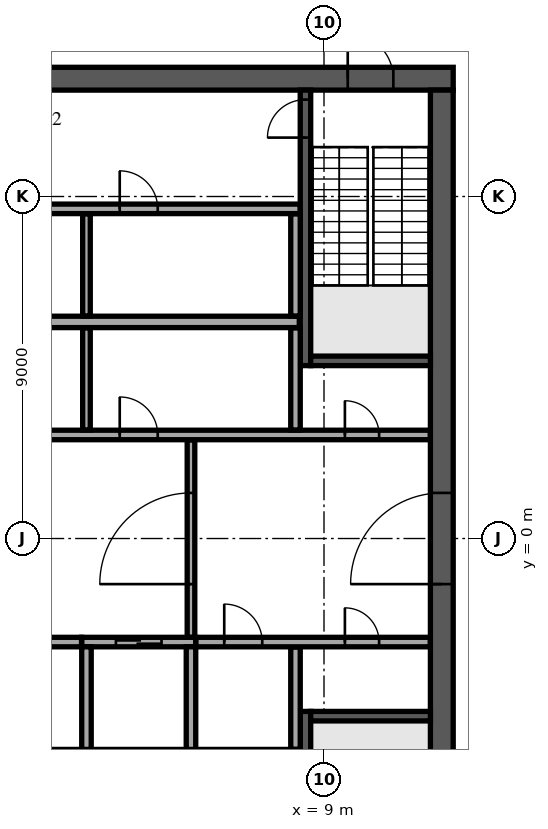
"""IFC4 building model, lengths in metres.
Left out: names, types, materials, properties, quantities, classifications, styles, units other than length and angle.
Written with IfcOpenShell. Run it as: python <this file> out.ifc"""

import sys

from ifc_helpers import new_model, si_unit, direction, frame, frame_2d, origin, place, context, subcontext, project, spatial, rectangle, extrude, element, fill, save


model = new_model("IFC4")
c1 = context("Model", 3, precision=1e-05, world=origin(), true_north=direction((0.0, 1.0)))
c2 = subcontext(c1, "Body", "Model", "MODEL_VIEW")
j1 = project(units=[si_unit("LENGTHUNIT", "METRE"), si_unit("PLANEANGLEUNIT", "RADIAN")], contexts=[c1])
p1 = place(None, origin())
s1 = spatial("IfcSite", under=j1, at=p1, CompositionType="ELEMENT")
p2 = place(p1, origin())
s2 = spatial("IfcBuilding", under=s1, at=p2, CompositionType="ELEMENT")
p3 = place(p2, frame((0.0, 0.0, 368.1)))
s3 = spatial("IfcBuildingStorey", under=s2, at=p3, CompositionType="ELEMENT", Elevation=368.1)
p4 = place(p3, frame((-12.4, 12.1, 0.0), z_axis=(0.0, 0.0, 1.0), x_axis=(1.0, 0.0, 0.0)))
e1 = element("IfcWall", 1, at=p4, inside=s3, PredefinedType="SHEAR", context=c2, shape_type="SweptSolid", body=[
    extrude(rectangle(XDim=24.8, YDim=0.6, at=frame_2d((12.4, 0.0))), origin(), (0.0, 0.0, 1.0), 4.7),
])
p5 = place(p4, frame((11.2, 0.0, 0.0)))
e2 = element("IfcOpeningElement", 2, at=p5, cuts=e1, PredefinedType="OPENING", context=c2, shape_type="SweptSolid", body=[
    extrude(rectangle(XDim=2.4, YDim=2.4, at=frame_2d((1.2, 1.2))), frame((0.0, 0.31, 0.0), z_axis=(0.0, -1.0, 0.0), x_axis=(1.0, 0.0, 0.0)), (0.0, 0.0, 1.0), 0.62),
])
p6 = place(p4, frame((22.025, 0.0, 0.0)))
e3 = element("IfcOpeningElement", 3, at=p6, cuts=e1, PredefinedType="OPENING", context=c2, shape_type="SweptSolid", body=[
    extrude(rectangle(XDim=1.2, YDim=2.1, at=frame_2d((0.6, 1.05))), frame((0.0, 0.31, 0.0), z_axis=(0.0, -1.0, 0.0), x_axis=(1.0, 0.0, 0.0)), (0.0, 0.0, 1.0), 0.62),
])
p7 = place(p4, frame((1.0, 0.0, 0.0)))
e4 = element("IfcOpeningElement", 4, at=p7, cuts=e1, PredefinedType="OPENING", context=c2, shape_type="SweptSolid", body=[
    extrude(rectangle(XDim=1.0, YDim=2.1, at=frame_2d((0.5, 1.05))), frame((0.0, 0.31, 0.0), z_axis=(0.0, -1.0, 0.0), x_axis=(1.0, 0.0, 0.0)), (0.0, 0.0, 1.0), 0.62),
])
p8 = place(p3, frame((12.1, -11.8, 0.0), z_axis=(0.0, 0.0, 1.0), x_axis=(0.0, 1.0, 0.0)))
e5 = element("IfcWall", 5, at=p8, inside=s3, PredefinedType="SHEAR", context=c2, shape_type="SweptSolid", body=[
    extrude(rectangle(XDim=23.6, YDim=0.6, at=frame_2d((11.8, 0.0))), origin(), (0.0, 0.0, 1.0), 4.7),
])
p9 = place(p8, frame((10.6, 0.0, 0.0)))
e6 = element("IfcOpeningElement", 6, at=p9, cuts=e5, PredefinedType="OPENING", context=c2, shape_type="SweptSolid", body=[
    extrude(rectangle(XDim=2.4, YDim=2.4, at=frame_2d((1.2, 1.2))), frame((0.0, 0.31, 0.0), z_axis=(0.0, -1.0, 0.0), x_axis=(1.0, 0.0, 0.0)), (0.0, 0.0, 1.0), 0.62),
])
p10 = place(p3, frame((-2.875, -5.7, 0.0), z_axis=(0.0, 0.0, 1.0), x_axis=(1.0, 0.0, 0.0)))
e7 = element("IfcWall", 7, at=p10, inside=s3, PredefinedType="SOLIDWALL", context=c2, shape_type="SweptSolid", body=[
    extrude(rectangle(XDim=11.25, YDim=0.3, at=frame_2d((5.625, 0.0))), origin(), (0.0, 0.0, 1.0), 4.7),
])
p11 = place(p3, frame((2.625, -2.725, 0.0), z_axis=(0.0, 0.0, 1.0), x_axis=(1.0, 0.0, 0.0)))
e8 = element("IfcWall", 8, at=p11, inside=s3, PredefinedType="SOLIDWALL", context=c2, shape_type="SweptSolid", body=[
    extrude(rectangle(XDim=3.0, YDim=0.25, at=frame_2d((1.5, 0.0))), origin(), (0.0, 0.0, 1.0), 4.7),
])
p12 = place(p11, frame((0.9, 0.0, 0.0)))
e9 = element("IfcOpeningElement", 9, at=p12, cuts=e8, PredefinedType="OPENING", context=c2, shape_type="SweptSolid", body=[
    extrude(rectangle(XDim=1.2, YDim=2.1, at=frame_2d((0.6, 1.05))), frame((0.0, 0.135, 0.0), z_axis=(0.0, -1.0, 0.0), x_axis=(1.0, 0.0, 0.0)), (0.0, 0.0, 1.0), 0.27),
])
for number, where, z_axis, x_axis in (
    (10, (2.75, -5.55, 0.0), (0.0, 0.0, 1.0), (0.0, 1.0, 0.0)),
    (11, (5.5, -5.55, 0.0), (0.0, 0.0, 1.0), (0.0, 1.0, 0.0)),
):
    element("IfcWall", number, at=place(p3, frame(where, z_axis=z_axis, x_axis=x_axis)), inside=s3, PredefinedType="SOLIDWALL", context=c2, shape_type="SweptSolid", body=[
        extrude(rectangle(XDim=2.7, YDim=0.25, at=frame_2d((1.35, 0.0))), origin(), (0.0, 0.0, 1.0), 4.7),
    ])
p13 = place(p3, frame((8.512, 4.55, 0.0), z_axis=(0.0, 0.0, 1.0), x_axis=(0.0, 1.0, 0.0)))
e12 = element("IfcWall", 12, at=p13, inside=s3, PredefinedType="SOLIDWALL", context=c2, shape_type="SweptSolid", body=[
    extrude(rectangle(XDim=7.25, YDim=0.275, at=frame_2d((3.625, 0.0))), origin(), (0.0, 0.0, 1.0), 4.7),
])
p14 = place(p13, frame((6.0, 0.0, 0.0)))
e13 = element("IfcOpeningElement", 13, at=p14, cuts=e12, PredefinedType="OPENING", context=c2, shape_type="SweptSolid", body=[
    extrude(rectangle(XDim=1.0, YDim=2.1, at=frame_2d((0.5, 1.05))), frame((0.0, 0.147, 0.0), z_axis=(0.0, -1.0, 0.0), x_axis=(1.0, 0.0, 0.0)), (0.0, 0.0, 1.0), 0.295),
])
p15 = place(p3, frame((8.65, 4.675, 0.0), z_axis=(0.0, 0.0, 1.0), x_axis=(1.0, 0.0, 0.0)))
e14 = element("IfcWall", 14, at=p15, inside=s3, PredefinedType="SOLIDWALL", context=c2, shape_type="SweptSolid", body=[
    extrude(rectangle(XDim=3.15, YDim=0.25, at=frame_2d((1.575, 0.0))), origin(), (0.0, 0.0, 1.0), 4.7),
])
p16 = place(p3, frame((8.512, -4.55, 0.0), z_axis=(0.0, 0.0, 1.0), x_axis=(0.0, -1.0, 0.0)))
e15 = element("IfcWall", 15, at=p16, inside=s3, PredefinedType="SOLIDWALL", context=c2, shape_type="SweptSolid", body=[
    extrude(rectangle(XDim=7.25, YDim=0.275, at=frame_2d((3.625, 0.0))), origin(), (0.0, 0.0, 1.0), 4.7),
])
p17 = place(p16, frame((6.0, 0.0, 0.0)))
e16 = element("IfcOpeningElement", 16, at=p17, cuts=e15, PredefinedType="OPENING", context=c2, shape_type="SweptSolid", body=[
    extrude(rectangle(XDim=1.0, YDim=2.1, at=frame_2d((0.5, 1.05))), frame((0.0, 0.147, 0.0), z_axis=(0.0, -1.0, 0.0), x_axis=(1.0, 0.0, 0.0)), (0.0, 0.0, 1.0), 0.295),
])
p18 = place(p3, frame((8.65, -4.675, 0.0), z_axis=(0.0, 0.0, 1.0), x_axis=(1.0, 0.0, 0.0)))
e17 = element("IfcWall", 17, at=p18, inside=s3, PredefinedType="SOLIDWALL", context=c2, shape_type="SweptSolid", body=[
    extrude(rectangle(XDim=3.15, YDim=0.25, at=frame_2d((1.575, 0.0))), origin(), (0.0, 0.0, 1.0), 4.7),
])
p19 = place(p3, frame((8.25, -5.545, 0.0), z_axis=(0.0, 0.0, 1.0), x_axis=(0.0, 1.0, 0.0)))
e18 = element("IfcWall", 18, at=p19, inside=s3, PredefinedType="PARTITIONING", context=c2, shape_type="SweptSolid", body=[
    extrude(rectangle(XDim=2.69, YDim=0.25, at=frame_2d((1.345, 0.0))), origin(), (0.0, 0.0, 1.0), 4.7),
])
p20 = place(p3, frame((-11.795, -2.725, 0.0), z_axis=(0.0, 0.0, 1.0), x_axis=(1.0, 0.0, 0.0)))
e19 = element("IfcWall", 19, at=p20, inside=s3, PredefinedType="PARTITIONING", context=c2, shape_type="SweptSolid", body=[
    extrude(rectangle(XDim=14.415, YDim=0.25, at=frame_2d((7.208, 0.0))), origin(), (0.0, 0.0, 1.0), 4.7),
])
p21 = place(p20, frame((1.295, 0.0, 0.0)))
e20 = element("IfcOpeningElement", 20, at=p21, cuts=e19, PredefinedType="OPENING", context=c2, shape_type="SweptSolid", body=[
    extrude(rectangle(XDim=1.0, YDim=2.1, at=frame_2d((0.5, 1.05))), frame((0.0, 0.135, 0.0), z_axis=(0.0, -1.0, 0.0), x_axis=(1.0, 0.0, 0.0)), (0.0, 0.0, 1.0), 0.27),
])
p22 = place(p20, frame((4.42, 0.0, 0.0)))
e21 = element("IfcOpeningElement", 21, at=p22, cuts=e19, PredefinedType="OPENING", context=c2, shape_type="SweptSolid", body=[
    extrude(rectangle(XDim=1.0, YDim=2.1, at=frame_2d((0.5, 1.05))), frame((0.0, 0.135, 0.0), z_axis=(0.0, -1.0, 0.0), x_axis=(1.0, 0.0, 0.0)), (0.0, 0.0, 1.0), 0.27),
])
p23 = place(p20, frame((9.92, 0.0, 0.0)))
e22 = element("IfcOpeningElement", 22, at=p23, cuts=e19, PredefinedType="OPENING", context=c2, shape_type="SweptSolid", body=[
    extrude(rectangle(XDim=1.0, YDim=2.1, at=frame_2d((0.5, 1.05))), frame((0.0, 0.135, 0.0), z_axis=(0.0, -1.0, 0.0), x_axis=(1.0, 0.0, 0.0)), (0.0, 0.0, 1.0), 0.27),
])
p24 = place(p3, frame((5.63, -2.725, 0.0), z_axis=(0.0, 0.0, 1.0), x_axis=(1.0, 0.0, 0.0)))
e23 = element("IfcWall", 23, at=p24, inside=s3, PredefinedType="PARTITIONING", context=c2, shape_type="SweptSolid", body=[
    extrude(rectangle(XDim=6.165, YDim=0.25, at=frame_2d((3.083, 0.0))), origin(), (0.0, 0.0, 1.0), 4.7),
])
p25 = place(p24, frame((0.745, 0.0, 0.0)))
e24 = element("IfcOpeningElement", 24, at=p25, cuts=e23, PredefinedType="OPENING", context=c2, shape_type="SweptSolid", body=[
    extrude(rectangle(XDim=1.0, YDim=2.1, at=frame_2d((0.5, 1.05))), frame((0.0, 0.135, 0.0), z_axis=(0.0, -1.0, 0.0), x_axis=(1.0, 0.0, 0.0)), (0.0, 0.0, 1.0), 0.27),
])
p26 = place(p24, frame((3.92, 0.0, 0.0)))
e25 = element("IfcOpeningElement", 25, at=p26, cuts=e23, PredefinedType="OPENING", context=c2, shape_type="SweptSolid", body=[
    extrude(rectangle(XDim=0.9, YDim=2.1, at=frame_2d((0.45, 1.05))), frame((0.0, 0.135, 0.0), z_axis=(0.0, -1.0, 0.0), x_axis=(1.0, 0.0, 0.0)), (0.0, 0.0, 1.0), 0.27),
])
p27 = place(p3, frame((5.5, -2.595, 0.0), z_axis=(0.0, 0.0, 1.0), x_axis=(0.0, 1.0, 0.0)))
e26 = element("IfcWall", 26, at=p27, inside=s3, PredefinedType="PARTITIONING", context=c2, shape_type="SweptSolid", body=[
    extrude(rectangle(XDim=5.19, YDim=0.2, at=frame_2d((2.595, 0.0))), origin(), (0.0, 0.0, 1.0), 4.7),
])
p28 = place(p27, frame((1.395, 0.0, 0.0)))
e27 = element("IfcOpeningElement", 27, at=p28, cuts=e26, PredefinedType="OPENING", context=c2, shape_type="SweptSolid", body=[
    extrude(rectangle(XDim=2.4, YDim=2.4, at=frame_2d((1.2, 1.2))), frame((0.0, 0.11, 0.0), z_axis=(0.0, -1.0, 0.0), x_axis=(1.0, 0.0, 0.0)), (0.0, 0.0, 1.0), 0.22),
])
p29 = place(p3, frame((-11.795, 2.725, 0.0), z_axis=(0.0, 0.0, 1.0), x_axis=(1.0, 0.0, 0.0)))
e28 = element("IfcWall", 28, at=p29, inside=s3, PredefinedType="PARTITIONING", context=c2, shape_type="SweptSolid", body=[
    extrude(rectangle(XDim=23.59, YDim=0.25, at=frame_2d((11.795, 0.0))), origin(), (0.0, 0.0, 1.0), 4.7),
])
p30 = place(p29, frame((21.345, 0.0, 0.0)))
e29 = element("IfcOpeningElement", 29, at=p30, cuts=e28, PredefinedType="OPENING", context=c2, shape_type="SweptSolid", body=[
    extrude(rectangle(XDim=0.9, YDim=2.1, at=frame_2d((0.45, 1.05))), frame((0.0, 0.135, 0.0), z_axis=(0.0, -1.0, 0.0), x_axis=(1.0, 0.0, 0.0)), (0.0, 0.0, 1.0), 0.27),
])
p31 = place(p29, frame((1.345, 0.0, 0.0)))
e30 = element("IfcOpeningElement", 30, at=p31, cuts=e28, PredefinedType="OPENING", context=c2, shape_type="SweptSolid", body=[
    extrude(rectangle(XDim=0.9, YDim=2.1, at=frame_2d((0.45, 1.05))), frame((0.0, 0.135, 0.0), z_axis=(0.0, -1.0, 0.0), x_axis=(1.0, 0.0, 0.0)), (0.0, 0.0, 1.0), 0.27),
])
p32 = place(p29, frame((4.32, 0.0, 0.0)))
e31 = element("IfcOpeningElement", 31, at=p32, cuts=e28, PredefinedType="OPENING", context=c2, shape_type="SweptSolid", body=[
    extrude(rectangle(XDim=1.2, YDim=2.1, at=frame_2d((0.6, 1.05))), frame((0.0, 0.135, 0.0), z_axis=(0.0, -1.0, 0.0), x_axis=(1.0, 0.0, 0.0)), (0.0, 0.0, 1.0), 0.27),
])
p33 = place(p29, frame((15.42, 0.0, 0.0)))
e32 = element("IfcOpeningElement", 32, at=p33, cuts=e28, PredefinedType="OPENING", context=c2, shape_type="SweptSolid", body=[
    extrude(rectangle(XDim=1.0, YDim=2.1, at=frame_2d((0.5, 1.05))), frame((0.0, 0.135, 0.0), z_axis=(0.0, -1.0, 0.0), x_axis=(1.0, 0.0, 0.0)), (0.0, 0.0, 1.0), 0.27),
])
p34 = place(p3, frame((2.75, 2.855, 0.0), z_axis=(0.0, 0.0, 1.0), x_axis=(0.0, 1.0, 0.0)))
e33 = element("IfcWall", 33, at=p34, inside=s3, PredefinedType="PARTITIONING", context=c2, shape_type="SweptSolid", body=[
    extrude(rectangle(XDim=2.69, YDim=0.2, at=frame_2d((1.345, 0.0))), origin(), (0.0, 0.0, 1.0), 4.7),
])
p35 = place(p3, frame((8.25, 2.855, 0.0), z_axis=(0.0, 0.0, 1.0), x_axis=(0.0, 1.0, 0.0)))
e34 = element("IfcWall", 34, at=p35, inside=s3, PredefinedType="PARTITIONING", context=c2, shape_type="SweptSolid", body=[
    extrude(rectangle(XDim=2.69, YDim=0.25, at=frame_2d((1.345, 0.0))), origin(), (0.0, 0.0, 1.0), 4.7),
])
p36 = place(p3, frame((-8.35, 5.7, 0.0), z_axis=(0.0, 0.0, 1.0), x_axis=(1.0, 0.0, 0.0)))
e35 = element("IfcWall", 35, at=p36, inside=s3, PredefinedType="PARTITIONING", context=c2, shape_type="SweptSolid", body=[
    extrude(rectangle(XDim=16.7, YDim=0.3, at=frame_2d((8.35, 0.0))), origin(), (0.0, 0.0, 1.0), 4.7),
])
p37 = place(p3, frame((2.75, 5.855, 0.0), z_axis=(0.0, 0.0, 1.0), x_axis=(0.0, 1.0, 0.0)))
e36 = element("IfcWall", 36, at=p37, inside=s3, PredefinedType="PARTITIONING", context=c2, shape_type="SweptSolid", body=[
    extrude(rectangle(XDim=2.69, YDim=0.2, at=frame_2d((1.345, 0.0))), origin(), (0.0, 0.0, 1.0), 4.7),
])
p38 = place(p3, frame((8.25, 5.855, 0.0), z_axis=(0.0, 0.0, 1.0), x_axis=(0.0, 1.0, 0.0)))
e37 = element("IfcWall", 37, at=p38, inside=s3, PredefinedType="PARTITIONING", context=c2, shape_type="SweptSolid", body=[
    extrude(rectangle(XDim=2.69, YDim=0.25, at=frame_2d((1.345, 0.0))), origin(), (0.0, 0.0, 1.0), 4.7),
])
p39 = place(p3, frame((-8.35, 8.675, 0.0), z_axis=(0.0, 0.0, 1.0), x_axis=(1.0, 0.0, 0.0)))
e38 = element("IfcWall", 38, at=p39, inside=s3, PredefinedType="PARTITIONING", context=c2, shape_type="SweptSolid", body=[
    extrude(rectangle(XDim=16.72, YDim=0.25, at=frame_2d((8.36, 0.0))), origin(), (0.0, 0.0, 1.0), 4.7),
])
p40 = place(p39, frame((0.875, 0.0, 0.0)))
e39 = element("IfcOpeningElement", 39, at=p40, cuts=e38, PredefinedType="OPENING", context=c2, shape_type="SweptSolid", body=[
    extrude(rectangle(XDim=1.2, YDim=2.1, at=frame_2d((0.6, 1.05))), frame((0.0, 0.135, 0.0), z_axis=(0.0, -1.0, 0.0), x_axis=(1.0, 0.0, 0.0)), (0.0, 0.0, 1.0), 0.27),
])
p41 = place(p39, frame((11.975, 0.0, 0.0)))
e40 = element("IfcOpeningElement", 40, at=p41, cuts=e38, PredefinedType="OPENING", context=c2, shape_type="SweptSolid", body=[
    extrude(rectangle(XDim=1.0, YDim=2.1, at=frame_2d((0.5, 1.05))), frame((0.0, 0.135, 0.0), z_axis=(0.0, -1.0, 0.0), x_axis=(1.0, 0.0, 0.0)), (0.0, 0.0, 1.0), 0.27),
])
p42 = place(p6, origin())
e41 = element("IfcDoor", 41, at=p42, inside=s3, OperationType="SINGLE_SWING_LEFT", PredefinedType="DOOR", context=c2, shape_type="SweptSolid", body=[
    extrude(rectangle(XDim=1.2, YDim=2.1, at=frame_2d((0.6, 1.05))), frame((0.0, 0.025, 0.0), z_axis=(0.0, -1.0, 0.0), x_axis=(1.0, 0.0, 0.0)), (0.0, 0.0, 1.0), 0.05),
])
fill(e3, e41)
p43 = place(p9, origin())
e42 = element("IfcDoor", 42, at=p43, inside=s3, OperationType="SINGLE_SWING_LEFT", PredefinedType="DOOR", context=c2, shape_type="SweptSolid", body=[
    extrude(rectangle(XDim=2.4, YDim=2.4, at=frame_2d((1.2, 1.2))), frame((0.0, 0.025, 0.0), z_axis=(0.0, -1.0, 0.0), x_axis=(1.0, 0.0, 0.0)), (0.0, 0.0, 1.0), 0.05),
])
fill(e6, e42)
p44 = place(p12, origin())
e43 = element("IfcDoor", 43, at=p44, inside=s3, OperationType="DOUBLE_DOOR_SLIDING", PredefinedType="DOOR", context=c2, shape_type="SweptSolid", body=[
    extrude(rectangle(XDim=1.2, YDim=2.1, at=frame_2d((0.6, 1.05))), frame((0.0, 0.025, 0.0), z_axis=(0.0, -1.0, 0.0), x_axis=(1.0, 0.0, 0.0)), (0.0, 0.0, 1.0), 0.05),
])
fill(e9, e43)
p45 = place(p14, origin())
e44 = element("IfcDoor", 44, at=p45, inside=s3, OperationType="SINGLE_SWING_LEFT", PredefinedType="DOOR", context=c2, shape_type="SweptSolid", body=[
    extrude(rectangle(XDim=1.0, YDim=2.1, at=frame_2d((0.5, 1.05))), frame((0.0, 0.025, 0.0), z_axis=(0.0, -1.0, 0.0), x_axis=(1.0, 0.0, 0.0)), (0.0, 0.0, 1.0), 0.05),
])
fill(e13, e44)
p46 = place(p25, origin())
e45 = element("IfcDoor", 45, at=p46, inside=s3, OperationType="SINGLE_SWING_LEFT", PredefinedType="DOOR", context=c2, shape_type="SweptSolid", body=[
    extrude(rectangle(XDim=1.0, YDim=2.1, at=frame_2d((0.5, 1.05))), frame((0.0, 0.025, 0.0), z_axis=(0.0, -1.0, 0.0), x_axis=(1.0, 0.0, 0.0)), (0.0, 0.0, 1.0), 0.05),
])
fill(e24, e45)
p47 = place(p30, origin())
e46 = element("IfcDoor", 46, at=p47, inside=s3, OperationType="SINGLE_SWING_LEFT", PredefinedType="DOOR", context=c2, shape_type="SweptSolid", body=[
    extrude(rectangle(XDim=0.9, YDim=2.1, at=frame_2d((0.45, 1.05))), frame((0.0, 0.025, 0.0), z_axis=(0.0, -1.0, 0.0), x_axis=(1.0, 0.0, 0.0)), (0.0, 0.0, 1.0), 0.05),
])
fill(e29, e46)
p48 = place(p26, origin())
e47 = element("IfcDoor", 47, at=p48, inside=s3, OperationType="SINGLE_SWING_LEFT", PredefinedType="DOOR", context=c2, shape_type="SweptSolid", body=[
    extrude(rectangle(XDim=0.9, YDim=2.1, at=frame_2d((0.45, 1.05))), frame((0.0, 0.025, 0.0), z_axis=(0.0, -1.0, 0.0), x_axis=(1.0, 0.0, 0.0)), (0.0, 0.0, 1.0), 0.05),
])
fill(e25, e47)
p49 = place(p33, origin())
e48 = element("IfcDoor", 48, at=p49, inside=s3, OperationType="SINGLE_SWING_LEFT", PredefinedType="DOOR", context=c2, shape_type="SweptSolid", body=[
    extrude(rectangle(XDim=1.0, YDim=2.1, at=frame_2d((0.5, 1.05))), frame((0.0, 0.025, 0.0), z_axis=(0.0, -1.0, 0.0), x_axis=(1.0, 0.0, 0.0)), (0.0, 0.0, 1.0), 0.05),
])
fill(e32, e48)
p50 = place(p41, origin())
e49 = element("IfcDoor", 49, at=p50, inside=s3, OperationType="SINGLE_SWING_LEFT", PredefinedType="DOOR", context=c2, shape_type="SweptSolid", body=[
    extrude(rectangle(XDim=1.0, YDim=2.1, at=frame_2d((0.5, 1.05))), frame((0.0, 0.025, 0.0), z_axis=(0.0, -1.0, 0.0), x_axis=(1.0, 0.0, 0.0)), (0.0, 0.0, 1.0), 0.05),
])
fill(e40, e49)
p51 = place(p28, origin())
e50 = element("IfcDoor", 50, at=p51, inside=s3, OperationType="SINGLE_SWING_LEFT", PredefinedType="DOOR", context=c2, shape_type="SweptSolid", body=[
    extrude(rectangle(XDim=2.4, YDim=2.4, at=frame_2d((1.2, 1.2))), frame((0.0, 0.025, 0.0), z_axis=(0.0, -1.0, 0.0), x_axis=(1.0, 0.0, 0.0)), (0.0, 0.0, 1.0), 0.05),
])
fill(e27, e50)
save(model, sys.argv[1])
